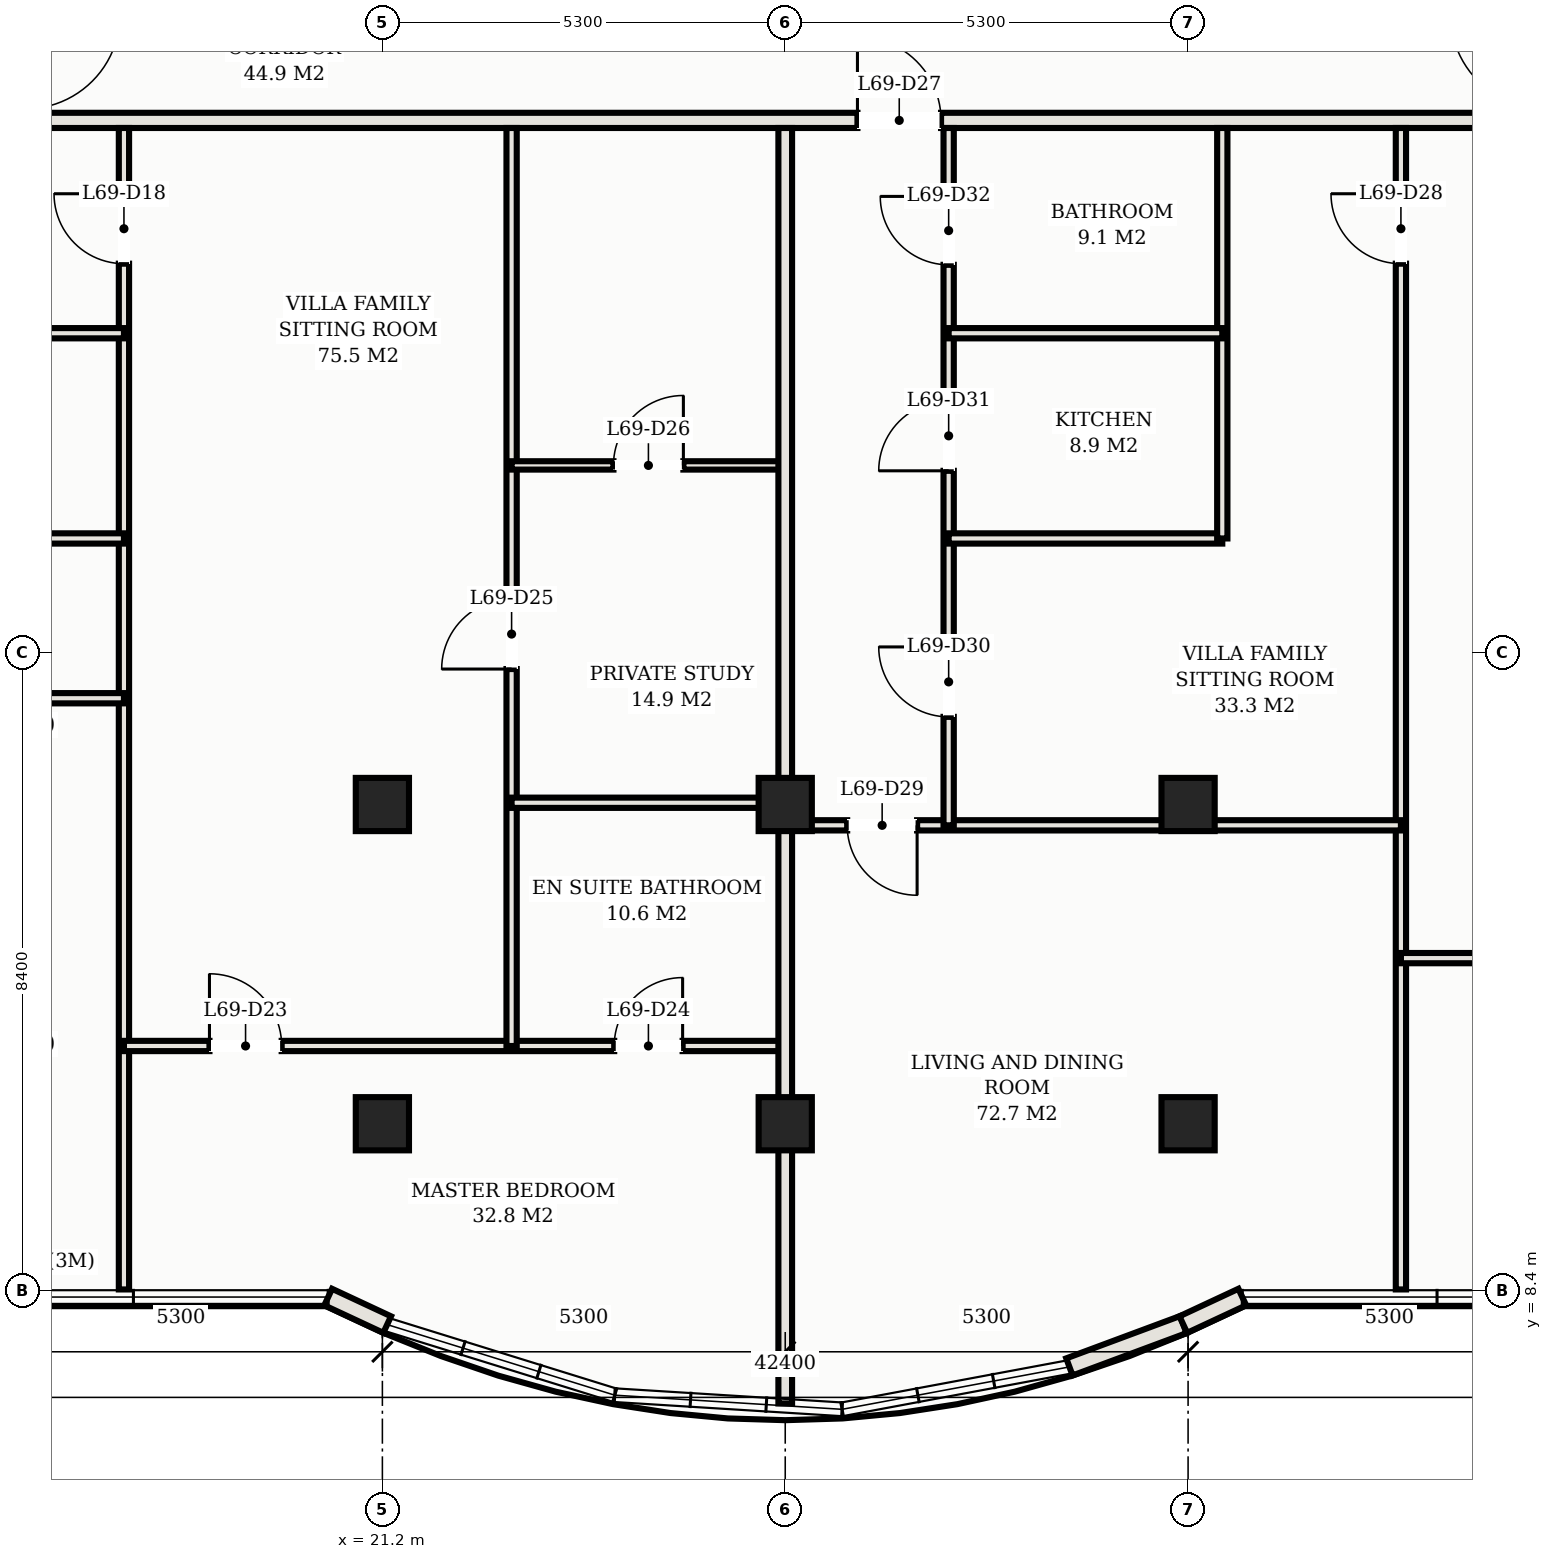
"""IFC4 building model, lengths in metres.
Left out: names, types, materials, properties, quantities, classifications, styles, units other than length and angle.
Written with IfcOpenShell. Run it as: python <this file> out.ifc"""

import sys

from ifc_helpers import new_model, si_unit, direction, frame, frame_2d, origin, origin_2d, place, context, subcontext, project, spatial, rectangle, hollow_rectangle, extrude, element, fill, save


model = new_model("IFC4")
c1 = context("Model", 3, precision=1e-05, world=origin(), true_north=direction((0.0, 1.0)))
c2 = subcontext(c1, "Body", "Model", "MODEL_VIEW")
j1 = project(units=[si_unit("LENGTHUNIT", "METRE"), si_unit("PLANEANGLEUNIT", "RADIAN")], contexts=[c1])
p1 = place(None, origin())
s1 = spatial("IfcSite", under=j1, at=p1, CompositionType="ELEMENT")
p2 = place(p1, origin())
s2 = spatial("IfcBuilding", under=s1, at=p2, CompositionType="ELEMENT")
p3 = place(p2, frame((0.0, 0.0, 249.5)))
s3 = spatial("IfcBuildingStorey", under=s2, at=p3, CompositionType="ELEMENT", Elevation=249.5)
for number, where, z_axis, x_axis in (
    (1, (21.2, 14.8, 0.0), (0.0, 0.0, 1.0), (1.0, 0.0, 0.0)),
    (2, (21.2, 10.6, 0.0), (0.0, 0.0, 1.0), (1.0, 0.0, 0.0)),
    (3, (26.5, 14.8, 0.0), (0.0, 0.0, 1.0), (1.0, 0.0, 0.0)),
    (4, (26.5, 10.6, 0.0), (0.0, 0.0, 1.0), (1.0, 0.0, 0.0)),
    (5, (31.8, 14.8, 0.0), (0.0, 0.0, 1.0), (1.0, 0.0, 0.0)),
    (6, (31.8, 10.6, 0.0), (0.0, 0.0, 1.0), (1.0, 0.0, 0.0)),
):
    element("IfcColumn", number, at=place(p3, frame(where, z_axis=z_axis, x_axis=x_axis)), inside=s3, PredefinedType="COLUMN", context=c2, shape_type="SweptSolid", body=[
        extrude(hollow_rectangle(XDim=0.7, YDim=0.7, WallThickness=0.025, at=origin_2d()), origin(), (0.0, 0.0, 1.0), 3.3),
    ])
p4 = place(p3, frame((20.487, 8.32, 0.0), z_axis=(0.0, 0.0, 1.0), x_axis=(0.906190424584, -0.422869855147, 0.0)))
e7 = element("IfcWall", 7, at=p4, inside=s3, PredefinedType="SOLIDWALL", context=c2, shape_type="SweptSolid", body=[
    extrude(rectangle(XDim=0.856, YDim=0.24, at=frame_2d((0.428, 0.0))), origin(), (0.0, 0.0, 1.0), 3.11),
])
p5 = place(p3, frame((30.239, 7.401, 0.0), z_axis=(0.0, 0.0, 1.0), x_axis=(0.937279890693, 0.34857769077, 0.0)))
e8 = element("IfcWall", 8, at=p5, inside=s3, PredefinedType="SOLIDWALL", context=c2, shape_type="SweptSolid", body=[
    extrude(rectangle(XDim=1.598, YDim=0.24, at=frame_2d((0.799, 0.0))), origin(), (0.0, 0.0, 1.0), 3.11),
])
p6 = place(p3, frame((31.737, 7.958, 0.0), z_axis=(0.0, 0.0, 1.0), x_axis=(0.906190424584, 0.422869855147, 0.0)))
e9 = element("IfcWall", 9, at=p6, inside=s3, PredefinedType="SOLIDWALL", context=c2, shape_type="SweptSolid", body=[
    extrude(rectangle(XDim=0.856, YDim=0.24, at=frame_2d((0.428, 0.0))), origin(), (0.0, 0.0, 1.0), 3.11),
])
p7 = place(p3, frame((8.6, 23.8, 0.0), z_axis=(0.0, 0.0, 1.0), x_axis=(1.0, 0.0, 0.0)))
e10 = element("IfcWall", 10, at=p7, inside=s3, PredefinedType="PARTITIONING", context=c2, shape_type="SweptSolid", body=[
    extrude(rectangle(XDim=35.8, YDim=0.2, at=frame_2d((17.9, 0.0))), origin(), (0.0, 0.0, 1.0), 2.45),
])
p8 = place(p7, frame((2.75, 0.0, 0.0)))
e11 = element("IfcOpeningElement", 11, at=p8, cuts=e10, PredefinedType="OPENING", context=c2, shape_type="SweptSolid", body=[
    extrude(rectangle(XDim=1.1, YDim=2.25, at=frame_2d((0.55, 1.125))), frame((0.0, 0.11, 0.0), z_axis=(0.0, -1.0, 0.0), x_axis=(1.0, 0.0, 0.0)), (0.0, 0.0, 1.0), 0.22),
])
p9 = place(p7, frame((18.85, 0.0, 0.0)))
e12 = element("IfcOpeningElement", 12, at=p9, cuts=e10, PredefinedType="OPENING", context=c2, shape_type="SweptSolid", body=[
    extrude(rectangle(XDim=1.1, YDim=2.25, at=frame_2d((0.55, 1.125))), frame((0.0, 0.11, 0.0), z_axis=(0.0, -1.0, 0.0), x_axis=(1.0, 0.0, 0.0)), (0.0, 0.0, 1.0), 0.22),
])
p10 = place(p7, frame((0.505, 0.0, 0.0)))
e13 = element("IfcOpeningElement", 13, at=p10, cuts=e10, PredefinedType="OPENING", context=c2, shape_type="SweptSolid", body=[
    extrude(rectangle(XDim=0.9, YDim=2.15, at=frame_2d((0.45, 1.075))), frame((0.0, 0.11, 0.0), z_axis=(0.0, -1.0, 0.0), x_axis=(1.0, 0.0, 0.0)), (0.0, 0.0, 1.0), 0.22),
])
p11 = place(p7, frame((34.395, 0.0, 0.0)))
e14 = element("IfcOpeningElement", 14, at=p11, cuts=e10, PredefinedType="OPENING", context=c2, shape_type="SweptSolid", body=[
    extrude(rectangle(XDim=0.9, YDim=2.15, at=frame_2d((0.45, 1.075))), frame((0.0, 0.11, 0.0), z_axis=(0.0, -1.0, 0.0), x_axis=(1.0, 0.0, 0.0)), (0.0, 0.0, 1.0), 0.22),
])
p12 = place(p3, frame((17.8, 8.42, 0.0), z_axis=(0.0, 0.0, 1.0), x_axis=(0.0, 1.0, 0.0)))
e15 = element("IfcWall", 15, at=p12, inside=s3, PredefinedType="PARTITIONING", context=c2, shape_type="SweptSolid", body=[
    extrude(rectangle(XDim=15.28, YDim=0.135, at=frame_2d((7.64, 0.0))), origin(), (0.0, 0.0, 1.0), 2.45),
])
p13 = place(p12, frame((13.495, 0.0, 0.0)))
e16 = element("IfcOpeningElement", 16, at=p13, cuts=e15, PredefinedType="OPENING", context=c2, shape_type="SweptSolid", body=[
    extrude(rectangle(XDim=0.92, YDim=2.15, at=frame_2d((0.46, 1.075))), frame((0.0, 0.078, 0.0), z_axis=(0.0, -1.0, 0.0), x_axis=(1.0, 0.0, 0.0)), (0.0, 0.0, 1.0), 0.155),
])
p14 = place(p3, frame((10.6, 16.198, 0.0), z_axis=(0.0, 0.0, 1.0), x_axis=(1.0, 0.0, 0.0)))
e17 = element("IfcWall", 17, at=p14, inside=s3, PredefinedType="PARTITIONING", context=c2, shape_type="SweptSolid", body=[
    extrude(rectangle(XDim=7.2, YDim=0.135, at=frame_2d((3.6, 0.0))), origin(), (0.0, 0.0, 1.0), 2.45),
])
p15 = place(p14, frame((0.815, 0.0, 0.0)))
e18 = element("IfcOpeningElement", 18, at=p15, cuts=e17, PredefinedType="OPENING", context=c2, shape_type="SweptSolid", body=[
    extrude(rectangle(XDim=0.92, YDim=2.15, at=frame_2d((0.46, 1.075))), frame((0.0, 0.078, 0.0), z_axis=(0.0, -1.0, 0.0), x_axis=(1.0, 0.0, 0.0)), (0.0, 0.0, 1.0), 0.155),
])
for number, where, z_axis, x_axis in (
    (19, (12.75, 18.3, 0.0), (0.0, 0.0, 1.0), (1.0, 0.0, 0.0)),
    (20, (12.75, 21.0, 0.0), (0.0, 0.0, 1.0), (1.0, 0.0, 0.0)),
):
    element("IfcWall", number, at=place(p3, frame(where, z_axis=z_axis, x_axis=x_axis)), inside=s3, PredefinedType="PARTITIONING", context=c2, shape_type="SweptSolid", body=[
        extrude(rectangle(XDim=5.05, YDim=0.135, at=frame_2d((2.525, 0.0))), origin(), (0.0, 0.0, 1.0), 2.45),
    ])
p16 = place(p3, frame((17.8, 11.623, 0.0), z_axis=(0.0, 0.0, 1.0), x_axis=(1.0, 0.0, 0.0)))
e21 = element("IfcWall", 21, at=p16, inside=s3, PredefinedType="PARTITIONING", context=c2, shape_type="SweptSolid", body=[
    extrude(rectangle(XDim=8.7, YDim=0.135, at=frame_2d((4.35, 0.0))), origin(), (0.0, 0.0, 1.0), 2.45),
])
p17 = place(p16, frame((1.125, 0.0, 0.0)))
e22 = element("IfcOpeningElement", 22, at=p17, cuts=e21, PredefinedType="OPENING", context=c2, shape_type="SweptSolid", body=[
    extrude(rectangle(XDim=0.95, YDim=2.15, at=frame_2d((0.475, 1.075))), frame((0.0, 0.078, 0.0), z_axis=(0.0, -1.0, 0.0), x_axis=(1.0, 0.0, 0.0)), (0.0, 0.0, 1.0), 0.155),
])
p18 = place(p16, frame((6.45, 0.0, 0.0)))
e23 = element("IfcOpeningElement", 23, at=p18, cuts=e21, PredefinedType="OPENING", context=c2, shape_type="SweptSolid", body=[
    extrude(rectangle(XDim=0.9, YDim=2.15, at=frame_2d((0.45, 1.075))), frame((0.0, 0.078, 0.0), z_axis=(0.0, -1.0, 0.0), x_axis=(1.0, 0.0, 0.0)), (0.0, 0.0, 1.0), 0.155),
])
p19 = place(p3, frame((22.9, 11.623, 0.0), z_axis=(0.0, 0.0, 1.0), x_axis=(0.0, 1.0, 0.0)))
e24 = element("IfcWall", 24, at=p19, inside=s3, PredefinedType="PARTITIONING", context=c2, shape_type="SweptSolid", body=[
    extrude(rectangle(XDim=12.077, YDim=0.135, at=frame_2d((6.039, 0.0))), origin(), (0.0, 0.0, 1.0), 2.45),
])
p20 = place(p19, frame((4.959, 0.0, 0.0)))
e25 = element("IfcOpeningElement", 25, at=p20, cuts=e24, PredefinedType="OPENING", context=c2, shape_type="SweptSolid", body=[
    extrude(rectangle(XDim=0.92, YDim=2.15, at=frame_2d((0.46, 1.075))), frame((0.0, 0.078, 0.0), z_axis=(0.0, -1.0, 0.0), x_axis=(1.0, 0.0, 0.0)), (0.0, 0.0, 1.0), 0.155),
])
p21 = place(p3, frame((22.9, 14.823, 0.0), z_axis=(0.0, 0.0, 1.0), x_axis=(1.0, 0.0, 0.0)))
e26 = element("IfcWall", 26, at=p21, inside=s3, PredefinedType="PARTITIONING", context=c2, shape_type="SweptSolid", body=[
    extrude(rectangle(XDim=3.6, YDim=0.135, at=frame_2d((1.8, 0.0))), origin(), (0.0, 0.0, 1.0), 2.45),
])
p22 = place(p3, frame((22.9, 19.261, 0.0), z_axis=(0.0, 0.0, 1.0), x_axis=(1.0, 0.0, 0.0)))
e27 = element("IfcWall", 27, at=p22, inside=s3, PredefinedType="MOVABLE", context=c2, shape_type="SweptSolid", body=[
    extrude(rectangle(XDim=3.6, YDim=0.11, at=frame_2d((1.8, 0.0))), origin(), (0.0, 0.0, 1.0), 2.45),
])
p23 = place(p22, frame((1.34, 0.0, 0.0)))
e28 = element("IfcOpeningElement", 28, at=p23, cuts=e27, PredefinedType="OPENING", context=c2, shape_type="SweptSolid", body=[
    extrude(rectangle(XDim=0.92, YDim=2.15, at=frame_2d((0.46, 1.075))), frame((0.0, 0.065, 0.0), z_axis=(0.0, -1.0, 0.0), x_axis=(1.0, 0.0, 0.0)), (0.0, 0.0, 1.0), 0.13),
])
p24 = place(p3, frame((26.5, 6.92, 0.0), z_axis=(0.0, 0.0, 1.0), x_axis=(0.0, 1.0, 0.0)))
e29 = element("IfcWall", 29, at=p24, inside=s3, PredefinedType="PARTITIONING", context=c2, shape_type="SweptSolid", body=[
    extrude(rectangle(XDim=16.78, YDim=0.18, at=frame_2d((8.39, 0.0))), origin(), (0.0, 0.0, 1.0), 2.45),
])
p25 = place(p3, frame((34.6, 8.42, 0.0), z_axis=(0.0, 0.0, 1.0), x_axis=(0.0, 1.0, 0.0)))
e30 = element("IfcWall", 30, at=p25, inside=s3, PredefinedType="PARTITIONING", context=c2, shape_type="SweptSolid", body=[
    extrude(rectangle(XDim=15.28, YDim=0.135, at=frame_2d((7.64, 0.0))), origin(), (0.0, 0.0, 1.0), 2.45),
])
p26 = place(p25, frame((13.495, 0.0, 0.0)))
e31 = element("IfcOpeningElement", 31, at=p26, cuts=e30, PredefinedType="OPENING", context=c2, shape_type="SweptSolid", body=[
    extrude(rectangle(XDim=0.92, YDim=2.15, at=frame_2d((0.46, 1.075))), frame((0.0, 0.078, 0.0), z_axis=(0.0, -1.0, 0.0), x_axis=(1.0, 0.0, 0.0)), (0.0, 0.0, 1.0), 0.155),
])
p27 = place(p3, frame((26.5, 14.526, 0.0), z_axis=(0.0, 0.0, 1.0), x_axis=(1.0, 0.0, 0.0)))
e32 = element("IfcWall", 32, at=p27, inside=s3, PredefinedType="PARTITIONING", context=c2, shape_type="SweptSolid", body=[
    extrude(rectangle(XDim=8.1, YDim=0.135, at=frame_2d((4.05, 0.0))), origin(), (0.0, 0.0, 1.0), 2.45),
])
p28 = place(p27, frame((0.815, 0.0, 0.0)))
e33 = element("IfcOpeningElement", 33, at=p28, cuts=e32, PredefinedType="OPENING", context=c2, shape_type="SweptSolid", body=[
    extrude(rectangle(XDim=0.92, YDim=2.15, at=frame_2d((0.46, 1.075))), frame((0.0, 0.078, 0.0), z_axis=(0.0, -1.0, 0.0), x_axis=(1.0, 0.0, 0.0)), (0.0, 0.0, 1.0), 0.155),
])
p29 = place(p3, frame((28.65, 14.526, 0.0), z_axis=(0.0, 0.0, 1.0), x_axis=(0.0, 1.0, 0.0)))
e34 = element("IfcWall", 34, at=p29, inside=s3, PredefinedType="PARTITIONING", context=c2, shape_type="SweptSolid", body=[
    extrude(rectangle(XDim=9.174, YDim=0.135, at=frame_2d((4.587, 0.0))), origin(), (0.0, 0.0, 1.0), 2.45),
])
p30 = place(p29, frame((1.427, 0.0, 0.0)))
e35 = element("IfcOpeningElement", 35, at=p30, cuts=e34, PredefinedType="OPENING", context=c2, shape_type="SweptSolid", body=[
    extrude(rectangle(XDim=0.92, YDim=2.15, at=frame_2d((0.46, 1.075))), frame((0.0, 0.078, 0.0), z_axis=(0.0, -1.0, 0.0), x_axis=(1.0, 0.0, 0.0)), (0.0, 0.0, 1.0), 0.155),
])
p31 = place(p29, frame((4.664, 0.0, 0.0)))
e36 = element("IfcOpeningElement", 36, at=p31, cuts=e34, PredefinedType="OPENING", context=c2, shape_type="SweptSolid", body=[
    extrude(rectangle(XDim=0.92, YDim=2.15, at=frame_2d((0.46, 1.075))), frame((0.0, 0.078, 0.0), z_axis=(0.0, -1.0, 0.0), x_axis=(1.0, 0.0, 0.0)), (0.0, 0.0, 1.0), 0.155),
])
p32 = place(p29, frame((7.374, 0.0, 0.0)))
e37 = element("IfcOpeningElement", 37, at=p32, cuts=e34, PredefinedType="OPENING", context=c2, shape_type="SweptSolid", body=[
    extrude(rectangle(XDim=0.9, YDim=2.15, at=frame_2d((0.45, 1.075))), frame((0.0, 0.078, 0.0), z_axis=(0.0, -1.0, 0.0), x_axis=(1.0, 0.0, 0.0)), (0.0, 0.0, 1.0), 0.155),
])
p33 = place(p3, frame((28.65, 18.3, 0.0), z_axis=(0.0, 0.0, 1.0), x_axis=(1.0, 0.0, 0.0)))
e38 = element("IfcWall", 38, at=p33, inside=s3, PredefinedType="PARTITIONING", context=c2, shape_type="SweptSolid", body=[
    extrude(rectangle(XDim=3.6, YDim=0.135, at=frame_2d((1.8, 0.0))), origin(), (0.0, 0.0, 1.0), 2.45),
])
p34 = place(p3, frame((32.25, 18.3, 0.0), z_axis=(0.0, 0.0, 1.0), x_axis=(0.0, 1.0, 0.0)))
e39 = element("IfcWall", 39, at=p34, inside=s3, PredefinedType="PARTITIONING", context=c2, shape_type="SweptSolid", body=[
    extrude(rectangle(XDim=5.4, YDim=0.135, at=frame_2d((2.7, 0.0))), origin(), (0.0, 0.0, 1.0), 2.45),
])
p35 = place(p3, frame((28.65, 21.0, 0.0), z_axis=(0.0, 0.0, 1.0), x_axis=(1.0, 0.0, 0.0)))
e40 = element("IfcWall", 40, at=p35, inside=s3, PredefinedType="PARTITIONING", context=c2, shape_type="SweptSolid", body=[
    extrude(rectangle(XDim=3.6, YDim=0.135, at=frame_2d((1.8, 0.0))), origin(), (0.0, 0.0, 1.0), 2.45),
])
p36 = place(p3, frame((34.6, 12.779, 0.0), z_axis=(0.0, 0.0, 1.0), x_axis=(1.0, 0.0, 0.0)))
e41 = element("IfcWall", 41, at=p36, inside=s3, PredefinedType="PARTITIONING", context=c2, shape_type="SweptSolid", body=[
    extrude(rectangle(XDim=7.8, YDim=0.135, at=frame_2d((3.9, 0.0))), origin(), (0.0, 0.0, 1.0), 2.45),
])
p37 = place(p36, frame((1.625, 0.0, 0.0)))
e42 = element("IfcOpeningElement", 42, at=p37, cuts=e41, PredefinedType="OPENING", context=c2, shape_type="SweptSolid", body=[
    extrude(rectangle(XDim=0.95, YDim=2.15, at=frame_2d((0.475, 1.075))), frame((0.0, 0.078, 0.0), z_axis=(0.0, -1.0, 0.0), x_axis=(1.0, 0.0, 0.0)), (0.0, 0.0, 1.0), 0.155),
])
p38 = place(p36, frame((5.55, 0.0, 0.0)))
e43 = element("IfcOpeningElement", 43, at=p38, cuts=e41, PredefinedType="OPENING", context=c2, shape_type="SweptSolid", body=[
    extrude(rectangle(XDim=0.9, YDim=2.15, at=frame_2d((0.45, 1.075))), frame((0.0, 0.078, 0.0), z_axis=(0.0, -1.0, 0.0), x_axis=(1.0, 0.0, 0.0)), (0.0, 0.0, 1.0), 0.155),
])
p39 = place(p13, origin())
e44 = element("IfcDoor", 44, at=p39, inside=s3, OperationType="SINGLE_SWING_RIGHT", PredefinedType="DOOR", context=c2, shape_type="SweptSolid", body=[
    extrude(rectangle(XDim=0.92, YDim=2.15, at=frame_2d((0.46, 1.075))), frame((0.0, 0.025, 0.0), z_axis=(0.0, -1.0, 0.0), x_axis=(1.0, 0.0, 0.0)), (0.0, 0.0, 1.0), 0.05),
])
fill(e16, e44)
p40 = place(p17, origin())
e45 = element("IfcDoor", 45, at=p40, inside=s3, OperationType="SINGLE_SWING_LEFT", PredefinedType="DOOR", context=c2, shape_type="SweptSolid", body=[
    extrude(rectangle(XDim=0.95, YDim=2.15, at=frame_2d((0.475, 1.075))), frame((0.0, 0.025, 0.0), z_axis=(0.0, -1.0, 0.0), x_axis=(1.0, 0.0, 0.0)), (0.0, 0.0, 1.0), 0.05),
])
fill(e22, e45)
p41 = place(p18, origin())
e46 = element("IfcDoor", 46, at=p41, inside=s3, OperationType="SINGLE_SWING_RIGHT", PredefinedType="DOOR", context=c2, shape_type="SweptSolid", body=[
    extrude(rectangle(XDim=0.9, YDim=2.15, at=frame_2d((0.45, 1.075))), frame((0.0, 0.025, 0.0), z_axis=(0.0, -1.0, 0.0), x_axis=(1.0, 0.0, 0.0)), (0.0, 0.0, 1.0), 0.05),
])
fill(e23, e46)
p42 = place(p20, origin())
e47 = element("IfcDoor", 47, at=p42, inside=s3, OperationType="SINGLE_SWING_LEFT", PredefinedType="DOOR", context=c2, shape_type="SweptSolid", body=[
    extrude(rectangle(XDim=0.92, YDim=2.15, at=frame_2d((0.46, 1.075))), frame((0.0, 0.025, 0.0), z_axis=(0.0, -1.0, 0.0), x_axis=(1.0, 0.0, 0.0)), (0.0, 0.0, 1.0), 0.05),
])
fill(e25, e47)
p43 = place(p23, origin())
e48 = element("IfcDoor", 48, at=p43, inside=s3, OperationType="SINGLE_SWING_RIGHT", PredefinedType="DOOR", context=c2, shape_type="SweptSolid", body=[
    extrude(rectangle(XDim=0.92, YDim=2.15, at=frame_2d((0.46, 1.075))), frame((0.0, 0.025, 0.0), z_axis=(0.0, -1.0, 0.0), x_axis=(1.0, 0.0, 0.0)), (0.0, 0.0, 1.0), 0.05),
])
fill(e28, e48)
p44 = place(p9, origin())
e49 = element("IfcDoor", 49, at=p44, inside=s3, OperationType="SINGLE_SWING_LEFT", PredefinedType="DOOR", context=c2, shape_type="SweptSolid", body=[
    extrude(rectangle(XDim=1.1, YDim=2.25, at=frame_2d((0.55, 1.125))), frame((0.0, 0.025, 0.0), z_axis=(0.0, -1.0, 0.0), x_axis=(1.0, 0.0, 0.0)), (0.0, 0.0, 1.0), 0.05),
])
fill(e12, e49)
p45 = place(p26, origin())
e50 = element("IfcDoor", 50, at=p45, inside=s3, OperationType="SINGLE_SWING_RIGHT", PredefinedType="DOOR", context=c2, shape_type="SweptSolid", body=[
    extrude(rectangle(XDim=0.92, YDim=2.15, at=frame_2d((0.46, 1.075))), frame((0.0, 0.025, 0.0), z_axis=(0.0, -1.0, 0.0), x_axis=(1.0, 0.0, 0.0)), (0.0, 0.0, 1.0), 0.05),
])
fill(e31, e50)
p46 = place(p28, frame((0.92, 0.0, 0.0), z_axis=(0.0, 0.0, 1.0), x_axis=(-1.0, 0.0, 0.0)))
e51 = element("IfcDoor", 51, at=p46, inside=s3, OperationType="SINGLE_SWING_LEFT", PredefinedType="DOOR", context=c2, shape_type="SweptSolid", body=[
    extrude(rectangle(XDim=0.92, YDim=2.15, at=frame_2d((0.46, 1.075))), frame((0.0, 0.025, 0.0), z_axis=(0.0, -1.0, 0.0), x_axis=(1.0, 0.0, 0.0)), (0.0, 0.0, 1.0), 0.05),
])
fill(e33, e51)
p47 = place(p30, origin())
e52 = element("IfcDoor", 52, at=p47, inside=s3, OperationType="SINGLE_SWING_RIGHT", PredefinedType="DOOR", context=c2, shape_type="SweptSolid", body=[
    extrude(rectangle(XDim=0.92, YDim=2.15, at=frame_2d((0.46, 1.075))), frame((0.0, 0.025, 0.0), z_axis=(0.0, -1.0, 0.0), x_axis=(1.0, 0.0, 0.0)), (0.0, 0.0, 1.0), 0.05),
])
fill(e35, e52)
p48 = place(p31, origin())
e53 = element("IfcDoor", 53, at=p48, inside=s3, OperationType="SINGLE_SWING_LEFT", PredefinedType="DOOR", context=c2, shape_type="SweptSolid", body=[
    extrude(rectangle(XDim=0.92, YDim=2.15, at=frame_2d((0.46, 1.075))), frame((0.0, 0.025, 0.0), z_axis=(0.0, -1.0, 0.0), x_axis=(1.0, 0.0, 0.0)), (0.0, 0.0, 1.0), 0.05),
])
fill(e36, e53)
p49 = place(p32, origin())
e54 = element("IfcDoor", 54, at=p49, inside=s3, OperationType="SINGLE_SWING_RIGHT", PredefinedType="DOOR", context=c2, shape_type="SweptSolid", body=[
    extrude(rectangle(XDim=0.9, YDim=2.15, at=frame_2d((0.45, 1.075))), frame((0.0, 0.025, 0.0), z_axis=(0.0, -1.0, 0.0), x_axis=(1.0, 0.0, 0.0)), (0.0, 0.0, 1.0), 0.05),
])
fill(e37, e54)
save(model, sys.argv[1])
